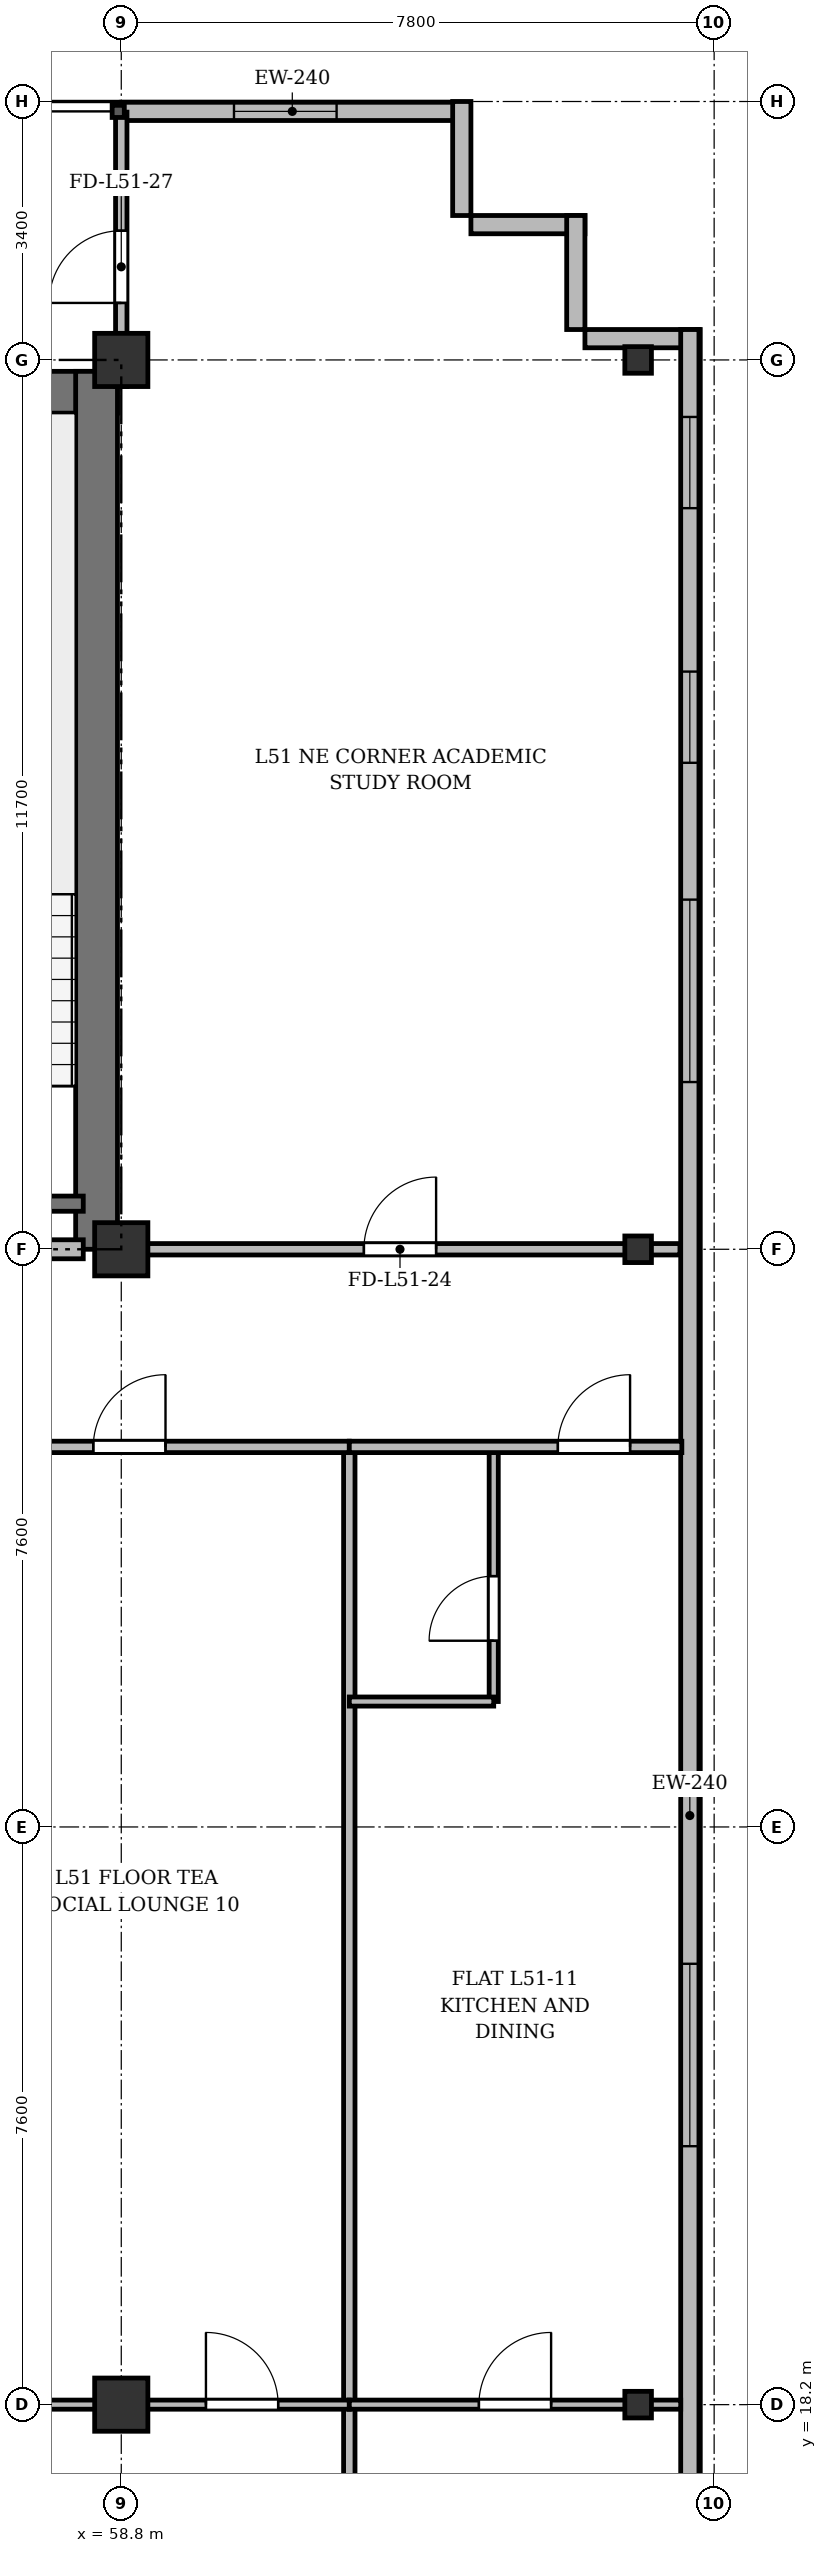
"""IFC4 building model, lengths in metres.
Left out: names, types, materials, properties, quantities, classifications, styles, units other than length and angle.
Written with IfcOpenShell. Run it as: python <this file> out.ifc"""

import sys

from ifc_helpers import new_model, si_unit, direction, frame, frame_2d, origin, origin_2d, place, context, subcontext, project, spatial, rectangle, i_section, extrude, source, transform, mapped, element, fill, save


model = new_model("IFC4")
c1 = context("Model", 3, precision=1e-05, world=origin(), true_north=direction((0.0, 1.0)))
c2 = subcontext(c1, "Body", "Model", "MODEL_VIEW")
j1 = project(units=[si_unit("LENGTHUNIT", "METRE"), si_unit("PLANEANGLEUNIT", "RADIAN")], contexts=[c1])
p1 = place(None, origin())
s1 = spatial("IfcSite", under=j1, at=p1, CompositionType="ELEMENT")
p2 = place(p1, origin())
s2 = spatial("IfcBuilding", under=s1, at=p2, CompositionType="ELEMENT")
p3 = place(p2, frame((0.0, 0.0, 197.7)))
s3 = spatial("IfcBuildingStorey", under=s2, at=p3, CompositionType="ELEMENT", Elevation=197.7)
m1 = source(origin(), c2, "Body", "SweptSolid", [
    extrude(rectangle(XDim=0.7, YDim=0.7, at=origin_2d()), origin(), (0.0, 0.0, 1.0), 3.6),
])
for number, where, z_axis, x_axis in (
    (1, (58.8, 18.2, 0.0), (0.0, 0.0, 1.0), (1.0, 0.0, 0.0)),
    (2, (58.8, 33.4, 0.0), (0.0, 0.0, 1.0), (1.0, 0.0, 0.0)),
    (3, (58.8, 45.1, 0.0), (0.0, 0.0, 1.0), (1.0, 0.0, 0.0)),
):
    element("IfcColumn", number, at=place(p3, frame(where, z_axis=z_axis, x_axis=x_axis)), inside=s3, PredefinedType="COLUMN", context=c2, shape_type="MappedRepresentation", body=[
        mapped(m1, transform((0.0, 0.0, 0.0), x_axis=(1.0, 0.0, 0.0), y_axis=(0.0, 1.0, 0.0), z_axis=(0.0, 0.0, 1.0), scale=1.0)),
    ])
m2 = source(origin(), c2, "Body", "SweptSolid", [
    extrude(i_section(OverallWidth=0.35, OverallDepth=0.35, WebThickness=0.018, FlangeThickness=0.028, at=origin_2d()), origin(), (0.0, 0.0, 1.0), 3.6),
])
for number, where, z_axis, x_axis in (
    (4, (65.6, 18.2, 0.0), (0.0, 0.0, 1.0), (1.0, 0.0, 0.0)),
    (5, (65.6, 33.4, 0.0), (0.0, 0.0, 1.0), (1.0, 0.0, 0.0)),
    (6, (65.6, 45.1, 0.0), (0.0, 0.0, 1.0), (1.0, 0.0, 0.0)),
):
    element("IfcColumn", number, at=place(p3, frame(where, z_axis=z_axis, x_axis=x_axis)), inside=s3, PredefinedType="COLUMN", context=c2, shape_type="MappedRepresentation", body=[
        mapped(m2, transform((0.0, 0.0, 0.0), x_axis=(1.0, 0.0, 0.0), y_axis=(0.0, 1.0, 0.0), z_axis=(0.0, 0.0, 1.0), scale=1.0)),
    ])
p4 = place(p3, frame((58.8, 48.37, 0.0), z_axis=(0.0, 0.0, 1.0), x_axis=(1.0, 0.0, 0.0)))
e7 = element("IfcWall", 7, at=p4, inside=s3, PredefinedType="SOLIDWALL", context=c2, shape_type="SweptSolid", body=[
    extrude(rectangle(XDim=4.5, YDim=0.24, at=frame_2d((2.25, 0.0))), origin(), (0.0, 0.0, 1.0), 3.36),
])
p5 = place(p4, frame((1.483, 0.0, 0.9)))
e8 = element("IfcOpeningElement", 8, at=p5, cuts=e7, PredefinedType="OPENING", context=c2, shape_type="SweptSolid", body=[
    extrude(rectangle(XDim=1.35, YDim=1.5, at=frame_2d((0.675, 0.75))), frame((0.0, 0.13, 0.0), z_axis=(0.0, -1.0, 0.0), x_axis=(1.0, 0.0, 0.0)), (0.0, 0.0, 1.0), 0.26),
])
for number, where, z_axis, x_axis in (
    (9, (63.28, 48.5, 0.0), (0.0, 0.0, 1.0), (0.0, -1.0, 0.0)),
    (10, (63.4, 46.88, 0.0), (0.0, 0.0, 1.0), (1.0, 0.0, 0.0)),
    (11, (64.78, 47.0, 0.0), (0.0, 0.0, 1.0), (0.0, -1.0, 0.0)),
    (12, (64.9, 45.38, 0.0), (0.0, 0.0, 1.0), (1.0, 0.0, 0.0)),
):
    element("IfcWall", number, at=place(p3, frame(where, z_axis=z_axis, x_axis=x_axis)), inside=s3, PredefinedType="SOLIDWALL", context=c2, shape_type="SweptSolid", body=[
        extrude(rectangle(XDim=1.5, YDim=0.24, at=frame_2d((0.75, 0.0))), origin(), (0.0, 0.0, 1.0), 3.36),
    ])
p6 = place(p3, frame((66.28, 45.5, 0.0), z_axis=(0.0, 0.0, 1.0), x_axis=(0.0, -1.0, 0.0)))
e13 = element("IfcWall", 13, at=p6, inside=s3, PredefinedType="SOLIDWALL", context=c2, shape_type="SweptSolid", body=[
    extrude(rectangle(XDim=39.1, YDim=0.24, at=frame_2d((19.55, 0.0))), origin(), (0.0, 0.0, 1.0), 3.36),
])
p7 = place(p6, frame((36.45, 0.0, 0.92)))
e14 = element("IfcOpeningElement", 14, at=p7, cuts=e13, PredefinedType="OPENING", context=c2, shape_type="SweptSolid", body=[
    extrude(rectangle(XDim=1.2, YDim=1.65, at=frame_2d((0.6, 0.825))), frame((0.0, 0.13, 0.0), z_axis=(0.0, -1.0, 0.0), x_axis=(1.0, 0.0, 0.0)), (0.0, 0.0, 1.0), 0.26),
])
p8 = place(p6, frame((32.9, 0.0, 0.92)))
e15 = element("IfcOpeningElement", 15, at=p8, cuts=e13, PredefinedType="OPENING", context=c2, shape_type="SweptSolid", body=[
    extrude(rectangle(XDim=2.4, YDim=2.1, at=frame_2d((1.2, 1.05))), frame((0.0, 0.13, 0.0), z_axis=(0.0, -1.0, 0.0), x_axis=(1.0, 0.0, 0.0)), (0.0, 0.0, 1.0), 0.26),
])
p9 = place(p6, frame((28.7, 0.0, 0.92)))
e16 = element("IfcOpeningElement", 16, at=p9, cuts=e13, PredefinedType="OPENING", context=c2, shape_type="SweptSolid", body=[
    extrude(rectangle(XDim=2.4, YDim=2.1, at=frame_2d((1.2, 1.05))), frame((0.0, 0.13, 0.0), z_axis=(0.0, -1.0, 0.0), x_axis=(1.0, 0.0, 0.0)), (0.0, 0.0, 1.0), 0.26),
])
p10 = place(p6, frame((21.5, 0.0, 0.92)))
e17 = element("IfcOpeningElement", 17, at=p10, cuts=e13, PredefinedType="OPENING", context=c2, shape_type="SweptSolid", body=[
    extrude(rectangle(XDim=2.4, YDim=2.1, at=frame_2d((1.2, 1.05))), frame((0.0, 0.13, 0.0), z_axis=(0.0, -1.0, 0.0), x_axis=(1.0, 0.0, 0.0)), (0.0, 0.0, 1.0), 0.26),
])
p11 = place(p6, frame((7.5, 0.0, 0.92)))
e18 = element("IfcOpeningElement", 18, at=p11, cuts=e13, PredefinedType="OPENING", context=c2, shape_type="SweptSolid", body=[
    extrude(rectangle(XDim=2.4, YDim=2.1, at=frame_2d((1.2, 1.05))), frame((0.0, 0.13, 0.0), z_axis=(0.0, -1.0, 0.0), x_axis=(1.0, 0.0, 0.0)), (0.0, 0.0, 1.0), 0.26),
])
p12 = place(p6, frame((4.5, 0.0, 0.92)))
e19 = element("IfcOpeningElement", 19, at=p12, cuts=e13, PredefinedType="OPENING", context=c2, shape_type="SweptSolid", body=[
    extrude(rectangle(XDim=1.2, YDim=1.65, at=frame_2d((0.6, 0.825))), frame((0.0, 0.13, 0.0), z_axis=(0.0, -1.0, 0.0), x_axis=(1.0, 0.0, 0.0)), (0.0, 0.0, 1.0), 0.26),
])
p13 = place(p6, frame((1.15, 0.0, 0.92)))
e20 = element("IfcOpeningElement", 20, at=p13, cuts=e13, PredefinedType="OPENING", context=c2, shape_type="SweptSolid", body=[
    extrude(rectangle(XDim=1.2, YDim=1.65, at=frame_2d((0.6, 0.825))), frame((0.0, 0.13, 0.0), z_axis=(0.0, -1.0, 0.0), x_axis=(1.0, 0.0, 0.0)), (0.0, 0.0, 1.0), 0.26),
])
p14 = place(p3, frame((15.65, 44.675, 0.0), z_axis=(0.0, 0.0, 1.0), x_axis=(1.0, 0.0, 0.0)))
e21 = element("IfcWall", 21, at=p14, inside=s3, PredefinedType="SHEAR", context=c2, shape_type="SweptSolid", body=[
    extrude(rectangle(XDim=43.1, YDim=0.55, at=frame_2d((21.55, 0.0))), origin(), (0.0, 0.0, 1.0), 3.36),
])
p15 = place(p3, frame((58.475, 33.4, 0.0), z_axis=(0.0, 0.0, 1.0), x_axis=(0.0, 1.0, 0.0)))
e22 = element("IfcWall", 22, at=p15, inside=s3, PredefinedType="SHEAR", context=c2, shape_type="SweptSolid", body=[
    extrude(rectangle(XDim=11.55, YDim=0.55, at=frame_2d((5.775, 0.0))), origin(), (0.0, 0.0, 1.0), 3.36),
])
p16 = place(p3, frame((54.9, 34.0, 0.0), z_axis=(0.0, 0.0, 1.0), x_axis=(1.0, 0.0, 0.0)))
e23 = element("IfcWall", 23, at=p16, inside=s3, PredefinedType="SHEAR", context=c2, shape_type="SweptSolid", body=[
    extrude(rectangle(XDim=3.4, YDim=0.2, at=frame_2d((1.7, 0.0))), origin(), (0.0, 0.0, 1.0), 3.36),
])
p17 = place(p3, frame((47.15, 33.4, 0.0), z_axis=(0.0, 0.0, 1.0), x_axis=(1.0, 0.0, 0.0)))
e24 = element("IfcWall", 24, at=p17, inside=s3, PredefinedType="PARTITIONING", context=c2, shape_type="SweptSolid", body=[
    extrude(rectangle(XDim=11.15, YDim=0.25, at=frame_2d((5.575, 0.0))), origin(), (0.0, 0.0, 1.0), 2.91),
])
p18 = place(p17, frame((0.7, 0.0, 0.0)))
e25 = element("IfcOpeningElement", 25, at=p18, cuts=e24, PredefinedType="OPENING", context=c2, shape_type="SweptSolid", body=[
    extrude(rectangle(XDim=0.95, YDim=2.15, at=frame_2d((0.475, 1.075))), frame((0.0, 0.135, 0.0), z_axis=(0.0, -1.0, 0.0), x_axis=(1.0, 0.0, 0.0)), (0.0, 0.0, 1.0), 0.27),
])
p19 = place(p17, frame((6.0, 0.0, 0.0)))
e26 = element("IfcOpeningElement", 26, at=p19, cuts=e24, PredefinedType="OPENING", context=c2, shape_type="SweptSolid", body=[
    extrude(rectangle(XDim=1.2, YDim=2.15, at=frame_2d((0.6, 1.075))), frame((0.0, 0.135, 0.0), z_axis=(0.0, -1.0, 0.0), x_axis=(1.0, 0.0, 0.0)), (0.0, 0.0, 1.0), 0.27),
])
p20 = place(p3, frame((58.8, 33.4, 0.0), z_axis=(0.0, 0.0, 1.0), x_axis=(1.0, 0.0, 0.0)))
e27 = element("IfcWall", 27, at=p20, inside=s3, PredefinedType="PARTITIONING", context=c2, shape_type="SweptSolid", body=[
    extrude(rectangle(XDim=7.35, YDim=0.15, at=frame_2d((3.675, 0.0))), origin(), (0.0, 0.0, 1.0), 2.91),
])
p21 = place(p20, frame((3.192, 0.0, 0.0)))
e28 = element("IfcOpeningElement", 28, at=p21, cuts=e27, PredefinedType="OPENING", context=c2, shape_type="SweptSolid", body=[
    extrude(rectangle(XDim=0.95, YDim=2.15, at=frame_2d((0.475, 1.075))), frame((0.0, 0.085, 0.0), z_axis=(0.0, -1.0, 0.0), x_axis=(1.0, 0.0, 0.0)), (0.0, 0.0, 1.0), 0.17),
])
p22 = place(p3, frame((58.8, 44.75, 0.0), z_axis=(0.0, 0.0, 1.0), x_axis=(0.0, 1.0, 0.0)))
e29 = element("IfcWall", 29, at=p22, inside=s3, PredefinedType="PARTITIONING", context=c2, shape_type="SweptSolid", body=[
    extrude(rectangle(XDim=3.61, YDim=0.15, at=frame_2d((1.805, 0.0))), origin(), (0.0, 0.0, 1.0), 2.86),
])
p23 = place(p22, frame((1.1, 0.0, 0.0)))
e30 = element("IfcOpeningElement", 30, at=p23, cuts=e29, PredefinedType="OPENING", context=c2, shape_type="SweptSolid", body=[
    extrude(rectangle(XDim=0.95, YDim=2.15, at=frame_2d((0.475, 1.075))), frame((0.0, 0.085, 0.0), z_axis=(0.0, -1.0, 0.0), x_axis=(1.0, 0.0, 0.0)), (0.0, 0.0, 1.0), 0.17),
])
p24 = place(p3, frame((61.8, 3.625, 0.0), z_axis=(0.0, 0.0, 1.0), x_axis=(0.0, 1.0, 0.0)))
e31 = element("IfcWall", 31, at=p24, inside=s3, PredefinedType="PARTITIONING", context=c2, shape_type="SweptSolid", body=[
    extrude(rectangle(XDim=27.175, YDim=0.15, at=frame_2d((13.587, 0.0))), origin(), (0.0, 0.0, 1.0), 2.91),
])
p25 = place(p3, frame((56.2, 30.8, 0.0), z_axis=(0.0, 0.0, 1.0), x_axis=(1.0, 0.0, 0.0)))
e32 = element("IfcWall", 32, at=p25, inside=s3, PredefinedType="PARTITIONING", context=c2, shape_type="SweptSolid", body=[
    extrude(rectangle(XDim=5.6, YDim=0.15, at=frame_2d((2.8, 0.0))), origin(), (0.0, 0.0, 1.0), 2.86),
])
p26 = place(p25, frame((2.232, 0.0, 0.0)))
e33 = element("IfcOpeningElement", 33, at=p26, cuts=e32, PredefinedType="OPENING", context=c2, shape_type="SweptSolid", body=[
    extrude(rectangle(XDim=0.95, YDim=2.15, at=frame_2d((0.475, 1.075))), frame((0.0, 0.085, 0.0), z_axis=(0.0, -1.0, 0.0), x_axis=(1.0, 0.0, 0.0)), (0.0, 0.0, 1.0), 0.17),
])
p27 = place(p3, frame((56.2, 18.2, 0.0), z_axis=(0.0, 0.0, 1.0), x_axis=(1.0, 0.0, 0.0)))
e34 = element("IfcWall", 34, at=p27, inside=s3, PredefinedType="PARTITIONING", context=c2, shape_type="SweptSolid", body=[
    extrude(rectangle(XDim=5.6, YDim=0.12, at=frame_2d((2.8, 0.0))), origin(), (0.0, 0.0, 1.0), 2.91),
])
p28 = place(p27, frame((3.714, 0.0, 0.0)))
e35 = element("IfcOpeningElement", 35, at=p28, cuts=e34, PredefinedType="OPENING", context=c2, shape_type="SweptSolid", body=[
    extrude(rectangle(XDim=0.95, YDim=2.15, at=frame_2d((0.475, 1.075))), frame((0.0, 0.07, 0.0), z_axis=(0.0, -1.0, 0.0), x_axis=(1.0, 0.0, 0.0)), (0.0, 0.0, 1.0), 0.14),
])
p29 = place(p3, frame((61.8, 18.2, 0.0), z_axis=(0.0, 0.0, 1.0), x_axis=(1.0, 0.0, 0.0)))
e36 = element("IfcWall", 36, at=p29, inside=s3, PredefinedType="PARTITIONING", context=c2, shape_type="SweptSolid", body=[
    extrude(rectangle(XDim=4.36, YDim=0.12, at=frame_2d((2.18, 0.0))), origin(), (0.0, 0.0, 1.0), 2.91),
])
p30 = place(p29, frame((1.705, 0.0, 0.0)))
e37 = element("IfcOpeningElement", 37, at=p30, cuts=e36, PredefinedType="OPENING", context=c2, shape_type="SweptSolid", body=[
    extrude(rectangle(XDim=0.95, YDim=2.15, at=frame_2d((0.475, 1.075))), frame((0.0, 0.07, 0.0), z_axis=(0.0, -1.0, 0.0), x_axis=(1.0, 0.0, 0.0)), (0.0, 0.0, 1.0), 0.14),
])
p31 = place(p3, frame((63.7, 27.45, 0.0), z_axis=(0.0, 0.0, 1.0), x_axis=(0.0, 1.0, 0.0)))
e38 = element("IfcWall", 38, at=p31, inside=s3, PredefinedType="PARTITIONING", context=c2, shape_type="SweptSolid", body=[
    extrude(rectangle(XDim=3.35, YDim=0.12, at=frame_2d((1.675, 0.0))), origin(), (0.0, 0.0, 1.0), 3.36),
])
p32 = place(p31, frame((0.8, 0.0, 0.0)))
e39 = element("IfcOpeningElement", 39, at=p32, cuts=e38, PredefinedType="OPENING", context=c2, shape_type="SweptSolid", body=[
    extrude(rectangle(XDim=0.85, YDim=2.1, at=frame_2d((0.425, 1.05))), frame((0.0, 0.07, 0.0), z_axis=(0.0, -1.0, 0.0), x_axis=(1.0, 0.0, 0.0)), (0.0, 0.0, 1.0), 0.14),
])
p33 = place(p3, frame((61.8, 27.45, 0.0), z_axis=(0.0, 0.0, 1.0), x_axis=(1.0, 0.0, 0.0)))
e40 = element("IfcWall", 40, at=p33, inside=s3, PredefinedType="PARTITIONING", context=c2, shape_type="SweptSolid", body=[
    extrude(rectangle(XDim=1.9, YDim=0.12, at=frame_2d((0.95, 0.0))), origin(), (0.0, 0.0, 1.0), 3.36),
])
p34 = place(p3, frame((61.8, 30.8, 0.0), z_axis=(0.0, 0.0, 1.0), x_axis=(1.0, 0.0, 0.0)))
e41 = element("IfcWall", 41, at=p34, inside=s3, PredefinedType="PARTITIONING", context=c2, shape_type="SweptSolid", body=[
    extrude(rectangle(XDim=4.375, YDim=0.15, at=frame_2d((2.188, 0.0))), origin(), (0.0, 0.0, 1.0), 2.86),
])
p35 = place(p34, frame((2.744, 0.0, 0.0)))
e42 = element("IfcOpeningElement", 42, at=p35, cuts=e41, PredefinedType="OPENING", context=c2, shape_type="SweptSolid", body=[
    extrude(rectangle(XDim=0.95, YDim=2.15, at=frame_2d((0.475, 1.075))), frame((0.0, 0.085, 0.0), z_axis=(0.0, -1.0, 0.0), x_axis=(1.0, 0.0, 0.0)), (0.0, 0.0, 1.0), 0.17),
])
m3 = source(origin(), c2, "Body", "SweptSolid", [
    extrude(rectangle(XDim=1.35, YDim=1.5, at=frame_2d((0.675, 0.75))), frame((0.0, 0.03, 0.0), z_axis=(0.0, -1.0, 0.0), x_axis=(1.0, 0.0, 0.0)), (0.0, 0.0, 1.0), 0.06),
])
p36 = place(p5, origin())
e43 = element("IfcWindow", 43, at=p36, inside=s3, PartitioningType="SINGLE_PANEL", PredefinedType="WINDOW", context=c2, shape_type="MappedRepresentation", body=[
    mapped(m3, transform((0.0, 0.0, 0.0), x_axis=(1.0, 0.0, 0.0), y_axis=(0.0, 1.0, 0.0), z_axis=(0.0, 0.0, 1.0), scale=1.0)),
])
fill(e8, e43)
m4 = source(origin(), c2, "Body", "SweptSolid", [
    extrude(rectangle(XDim=2.4, YDim=2.1, at=frame_2d((1.2, 1.05))), frame((0.0, 0.03, 0.0), z_axis=(0.0, -1.0, 0.0), x_axis=(1.0, 0.0, 0.0)), (0.0, 0.0, 1.0), 0.06),
])
p37 = place(p10, origin())
e44 = element("IfcWindow", 44, at=p37, inside=s3, PartitioningType="SINGLE_PANEL", PredefinedType="WINDOW", context=c2, shape_type="MappedRepresentation", body=[
    mapped(m4, transform((0.0, 0.0, 0.0), x_axis=(1.0, 0.0, 0.0), y_axis=(0.0, 1.0, 0.0), z_axis=(0.0, 0.0, 1.0), scale=1.0)),
])
fill(e17, e44)
p38 = place(p11, origin())
e45 = element("IfcWindow", 45, at=p38, inside=s3, PartitioningType="SINGLE_PANEL", PredefinedType="WINDOW", context=c2, shape_type="MappedRepresentation", body=[
    mapped(m4, transform((0.0, 0.0, 0.0), x_axis=(1.0, 0.0, 0.0), y_axis=(0.0, 1.0, 0.0), z_axis=(0.0, 0.0, 1.0), scale=1.0)),
])
fill(e18, e45)
m5 = source(origin(), c2, "Body", "SweptSolid", [
    extrude(rectangle(XDim=1.2, YDim=1.65, at=frame_2d((0.6, 0.825))), frame((0.0, 0.03, 0.0), z_axis=(0.0, -1.0, 0.0), x_axis=(1.0, 0.0, 0.0)), (0.0, 0.0, 1.0), 0.06),
])
p39 = place(p12, origin())
e46 = element("IfcWindow", 46, at=p39, inside=s3, PartitioningType="SINGLE_PANEL", PredefinedType="WINDOW", context=c2, shape_type="MappedRepresentation", body=[
    mapped(m5, transform((0.0, 0.0, 0.0), x_axis=(1.0, 0.0, 0.0), y_axis=(0.0, 1.0, 0.0), z_axis=(0.0, 0.0, 1.0), scale=1.0)),
])
fill(e19, e46)
p40 = place(p13, origin())
e47 = element("IfcWindow", 47, at=p40, inside=s3, PartitioningType="SINGLE_PANEL", PredefinedType="WINDOW", context=c2, shape_type="MappedRepresentation", body=[
    mapped(m5, transform((0.0, 0.0, 0.0), x_axis=(1.0, 0.0, 0.0), y_axis=(0.0, 1.0, 0.0), z_axis=(0.0, 0.0, 1.0), scale=1.0)),
])
fill(e20, e47)
m6 = source(origin(), c2, "Body", "SweptSolid", [
    extrude(rectangle(XDim=0.95, YDim=2.15, at=frame_2d((0.475, 1.075))), frame((0.0, 0.025, 0.0), z_axis=(0.0, -1.0, 0.0), x_axis=(1.0, 0.0, 0.0)), (0.0, 0.0, 1.0), 0.05),
])
p41 = place(p21, origin())
e48 = element("IfcDoor", 48, at=p41, inside=s3, OperationType="SINGLE_SWING_RIGHT", PredefinedType="DOOR", context=c2, shape_type="MappedRepresentation", body=[
    mapped(m6, transform((0.0, 0.0, 0.0), x_axis=(1.0, 0.0, 0.0), y_axis=(0.0, 1.0, 0.0), z_axis=(0.0, 0.0, 1.0), scale=1.0)),
])
fill(e28, e48)
p42 = place(p23, origin())
e49 = element("IfcDoor", 49, at=p42, inside=s3, OperationType="SINGLE_SWING_LEFT", PredefinedType="DOOR", context=c2, shape_type="MappedRepresentation", body=[
    mapped(m6, transform((0.0, 0.0, 0.0), x_axis=(1.0, 0.0, 0.0), y_axis=(0.0, 1.0, 0.0), z_axis=(0.0, 0.0, 1.0), scale=1.0)),
])
fill(e30, e49)
p43 = place(p26, origin())
e50 = element("IfcDoor", 50, at=p43, inside=s3, OperationType="SINGLE_SWING_RIGHT", PredefinedType="DOOR", context=c2, shape_type="MappedRepresentation", body=[
    mapped(m6, transform((0.0, 0.0, 0.0), x_axis=(1.0, 0.0, 0.0), y_axis=(0.0, 1.0, 0.0), z_axis=(0.0, 0.0, 1.0), scale=1.0)),
])
fill(e33, e50)
p44 = place(p28, origin())
e51 = element("IfcDoor", 51, at=p44, inside=s3, OperationType="SINGLE_SWING_LEFT", PredefinedType="DOOR", context=c2, shape_type="MappedRepresentation", body=[
    mapped(m6, transform((0.0, 0.0, 0.0), x_axis=(1.0, 0.0, 0.0), y_axis=(0.0, 1.0, 0.0), z_axis=(0.0, 0.0, 1.0), scale=1.0)),
])
fill(e35, e51)
p45 = place(p30, origin())
e52 = element("IfcDoor", 52, at=p45, inside=s3, OperationType="SINGLE_SWING_RIGHT", PredefinedType="DOOR", context=c2, shape_type="MappedRepresentation", body=[
    mapped(m6, transform((0.0, 0.0, 0.0), x_axis=(1.0, 0.0, 0.0), y_axis=(0.0, 1.0, 0.0), z_axis=(0.0, 0.0, 1.0), scale=1.0)),
])
fill(e37, e52)
m7 = source(origin(), c2, "Body", "SweptSolid", [
    extrude(rectangle(XDim=0.85, YDim=2.1, at=frame_2d((0.425, 1.05))), frame((0.0, 0.025, 0.0), z_axis=(0.0, -1.0, 0.0), x_axis=(1.0, 0.0, 0.0)), (0.0, 0.0, 1.0), 0.05),
])
p46 = place(p32, origin())
e53 = element("IfcDoor", 53, at=p46, inside=s3, OperationType="SINGLE_SWING_LEFT", PredefinedType="DOOR", context=c2, shape_type="MappedRepresentation", body=[
    mapped(m7, transform((0.0, 0.0, 0.0), x_axis=(1.0, 0.0, 0.0), y_axis=(0.0, 1.0, 0.0), z_axis=(0.0, 0.0, 1.0), scale=1.0)),
])
fill(e39, e53)
p47 = place(p35, origin())
e54 = element("IfcDoor", 54, at=p47, inside=s3, OperationType="SINGLE_SWING_RIGHT", PredefinedType="DOOR", context=c2, shape_type="MappedRepresentation", body=[
    mapped(m6, transform((0.0, 0.0, 0.0), x_axis=(1.0, 0.0, 0.0), y_axis=(0.0, 1.0, 0.0), z_axis=(0.0, 0.0, 1.0), scale=1.0)),
])
fill(e42, e54)
save(model, sys.argv[1])
